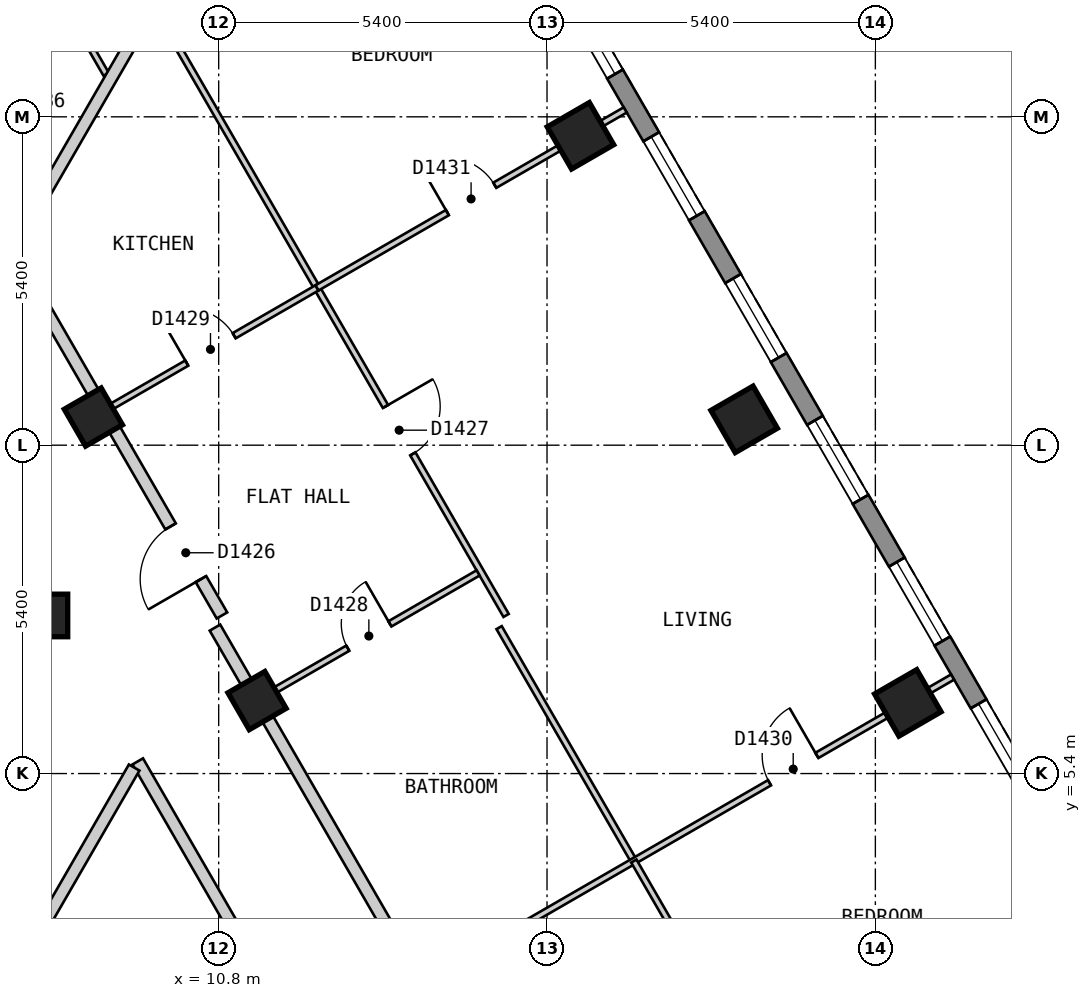
"""IFC4 building model, lengths in metres.
Left out: names, types, materials, properties, quantities, classifications, styles, units other than length and angle.
Written with IfcOpenShell. Run it as: python <this file> out.ifc"""

import sys

from ifc_helpers import new_model, si_unit, direction, frame, frame_2d, origin, origin_2d, place, context, subcontext, project, spatial, polyline, rectangle, outline, extrude, element, fill, save


model = new_model("IFC4")
c1 = context("Model", 3, precision=1e-05, world=origin(), true_north=direction((0.0, 1.0)))
c2 = subcontext(c1, "Body", "Model", "MODEL_VIEW")
j1 = project(units=[si_unit("LENGTHUNIT", "METRE"), si_unit("PLANEANGLEUNIT", "RADIAN")], contexts=[c1])
p1 = place(None, origin())
s1 = spatial("IfcSite", under=j1, at=p1, CompositionType="ELEMENT")
p2 = place(p1, origin())
s2 = spatial("IfcBuilding", under=s1, at=p2, CompositionType="ELEMENT")
p3 = place(p2, frame((0.0, 0.0, 166.2)))
s3 = spatial("IfcBuildingStorey", under=s2, at=p3, CompositionType="ELEMENT", Elevation=166.2)
for number, where, z_axis, x_axis in (
    (1, (22.134, 6.562, 0.0), (0.0, 0.0, 1.0), (-0.5, 0.866, 0.0)),
    (2, (19.442, 11.225, 0.0), (0.0, 0.0, 1.0), (-0.5, 0.866, 0.0)),
    (3, (16.75, 15.888, 0.0), (0.0, 0.0, 1.0), (-0.5, 0.866, 0.0)),
):
    element("IfcColumn", number, at=place(p3, frame(where, z_axis=z_axis, x_axis=x_axis)), inside=s3, PredefinedType="COLUMN", context=c2, shape_type="SweptSolid", body=[
        extrude(rectangle(XDim=0.8, YDim=0.8, at=origin_2d()), origin(), (0.0, 0.0, 1.0), 3.0),
    ])
for number, where, z_axis, x_axis in (
    (4, (11.431, 6.6, 0.0), (0.0, 0.0, 1.0), (-0.5, 0.866, 0.0)),
    (5, (7.967, 8.0, 0.0), (0.0, 0.0, 1.0), (1.0, 0.0, 0.0)),
    (6, (8.739, 11.263, 0.0), (0.0, 0.0, 1.0), (-0.5, 0.866, 0.0)),
):
    element("IfcColumn", number, at=place(p3, frame(where, z_axis=z_axis, x_axis=x_axis)), inside=s3, PredefinedType="COLUMN", context=c2, shape_type="SweptSolid", body=[
        extrude(rectangle(XDim=0.7, YDim=0.7, at=origin_2d()), origin(), (0.0, 0.0, 1.0), 3.0),
    ])
p4 = place(p3, frame((26.024, 1.825, 0.0), z_axis=(0.0, 0.0, 1.0), x_axis=(-0.500010537973, 0.866019319597, 0.0)))
e7 = element("IfcWall", 7, at=p4, inside=s3, PredefinedType="SOLIDWALL", context=c2, shape_type="SweptSolid", body=[
    extrude(outline(polyline([(0.0, -0.15), (22.863, -0.15), (22.783, 0.15), (0.08, 0.15), (0.0, -0.15)])), origin(), (0.0, 0.0, 1.0), 2.7),
])
p5 = place(p4, frame((1.259, 0.0, 0.15)))
e8 = element("IfcOpeningElement", 8, at=p5, cuts=e7, PredefinedType="OPENING", context=c2, shape_type="SweptSolid", body=[
    extrude(rectangle(XDim=1.5, YDim=2.1, at=frame_2d((0.75, 1.05))), frame((0.0, 0.16, 0.0), z_axis=(0.0, -1.0, 0.0), x_axis=(1.0, 0.0, 0.0)), (0.0, 0.0, 1.0), 0.32),
])
p6 = place(p4, frame((3.952, 0.0, 0.15)))
e9 = element("IfcOpeningElement", 9, at=p6, cuts=e7, PredefinedType="OPENING", context=c2, shape_type="SweptSolid", body=[
    extrude(rectangle(XDim=1.5, YDim=2.1, at=frame_2d((0.75, 1.05))), frame((0.0, 0.16, 0.0), z_axis=(0.0, -1.0, 0.0), x_axis=(1.0, 0.0, 0.0)), (0.0, 0.0, 1.0), 0.32),
])
p7 = place(p4, frame((6.644, 0.0, 0.15)))
e10 = element("IfcOpeningElement", 10, at=p7, cuts=e7, PredefinedType="OPENING", context=c2, shape_type="SweptSolid", body=[
    extrude(rectangle(XDim=1.5, YDim=2.1, at=frame_2d((0.75, 1.05))), frame((0.0, 0.16, 0.0), z_axis=(0.0, -1.0, 0.0), x_axis=(1.0, 0.0, 0.0)), (0.0, 0.0, 1.0), 0.32),
])
p8 = place(p4, frame((9.335, 0.0, 0.15)))
e11 = element("IfcOpeningElement", 11, at=p8, cuts=e7, PredefinedType="OPENING", context=c2, shape_type="SweptSolid", body=[
    extrude(rectangle(XDim=1.5, YDim=2.1, at=frame_2d((0.75, 1.05))), frame((0.0, 0.16, 0.0), z_axis=(0.0, -1.0, 0.0), x_axis=(1.0, 0.0, 0.0)), (0.0, 0.0, 1.0), 0.32),
])
p9 = place(p4, frame((12.028, 0.0, 0.15)))
e12 = element("IfcOpeningElement", 12, at=p9, cuts=e7, PredefinedType="OPENING", context=c2, shape_type="SweptSolid", body=[
    extrude(rectangle(XDim=1.5, YDim=2.1, at=frame_2d((0.75, 1.05))), frame((0.0, 0.16, 0.0), z_axis=(0.0, -1.0, 0.0), x_axis=(1.0, 0.0, 0.0)), (0.0, 0.0, 1.0), 0.32),
])
p10 = place(p4, frame((14.72, 0.0, 0.15)))
e13 = element("IfcOpeningElement", 13, at=p10, cuts=e7, PredefinedType="OPENING", context=c2, shape_type="SweptSolid", body=[
    extrude(rectangle(XDim=1.5, YDim=2.1, at=frame_2d((0.75, 1.05))), frame((0.0, 0.16, 0.0), z_axis=(0.0, -1.0, 0.0), x_axis=(1.0, 0.0, 0.0)), (0.0, 0.0, 1.0), 0.32),
])
p11 = place(p4, frame((17.411, 0.0, 0.15)))
e14 = element("IfcOpeningElement", 14, at=p11, cuts=e7, PredefinedType="OPENING", context=c2, shape_type="SweptSolid", body=[
    extrude(rectangle(XDim=1.5, YDim=2.1, at=frame_2d((0.75, 1.05))), frame((0.0, 0.16, 0.0), z_axis=(0.0, -1.0, 0.0), x_axis=(1.0, 0.0, 0.0)), (0.0, 0.0, 1.0), 0.32),
])
p12 = place(p4, frame((20.104, 0.0, 0.15)))
e15 = element("IfcOpeningElement", 15, at=p12, cuts=e7, PredefinedType="OPENING", context=c2, shape_type="SweptSolid", body=[
    extrude(rectangle(XDim=1.5, YDim=2.1, at=frame_2d((0.75, 1.05))), frame((0.0, 0.16, 0.0), z_axis=(0.0, -1.0, 0.0), x_axis=(1.0, 0.0, 0.0)), (0.0, 0.0, 1.0), 0.32),
])
p13 = place(p3, frame((9.469, 5.6, 0.0), z_axis=(0.0, 0.0, 1.0), x_axis=(0.499964524401, -0.866045884662, 0.0)))
e16 = element("IfcWall", 16, at=p13, inside=s3, PredefinedType="PARTITIONING", context=c2, shape_type="SweptSolid", body=[
    extrude(rectangle(XDim=7.042, YDim=0.2, at=frame_2d((3.521, 0.0))), origin(), (0.0, 0.0, 1.0), 2.7),
])
p14 = place(p13, frame((3.129, 0.0, 0.0)))
e17 = element("IfcOpeningElement", 17, at=p14, cuts=e16, PredefinedType="OPENING", context=c2, shape_type="SweptSolid", body=[
    extrude(rectangle(XDim=0.9, YDim=2.1, at=frame_2d((0.45, 1.05))), frame((0.0, 0.11, 0.0), z_axis=(0.0, -1.0, 0.0), x_axis=(1.0, 0.0, 0.0)), (0.0, 0.0, 1.0), 0.22),
])
p15 = place(p3, frame((10.739, 7.8, 0.0), z_axis=(0.0, 0.0, 1.0), x_axis=(0.499964311759, -0.86604600742, 0.0)))
e18 = element("IfcWall", 18, at=p15, inside=s3, PredefinedType="PARTITIONING", context=c2, shape_type="SweptSolid", body=[
    extrude(rectangle(XDim=9.583, YDim=0.2, at=frame_2d((4.792, 0.0))), origin(), (0.0, 0.0, 1.0), 2.7),
])
p16 = place(p3, frame((5.485, 17.3, 0.0), z_axis=(0.0, 0.0, 1.0), x_axis=(0.499965832213, -0.866045129667, 0.0)))
e19 = element("IfcWall", 19, at=p16, inside=s3, PredefinedType="PARTITIONING", context=c2, shape_type="SweptSolid", body=[
    extrude(rectangle(XDim=10.739, YDim=0.2, at=frame_2d((5.369, 0.0))), origin(), (0.0, 0.0, 1.0), 2.7),
])
p17 = place(p16, frame((9.048, 0.0, 0.0)))
e20 = element("IfcOpeningElement", 20, at=p17, cuts=e19, PredefinedType="OPENING", context=c2, shape_type="SweptSolid", body=[
    extrude(rectangle(XDim=1.0, YDim=2.1, at=frame_2d((0.5, 1.05))), frame((0.0, 0.11, 0.0), z_axis=(0.0, -1.0, 0.0), x_axis=(1.0, 0.0, 0.0)), (0.0, 0.0, 1.0), 0.22),
])
p18 = place(p16, frame((0.161, 0.0, 0.0)))
e21 = element("IfcOpeningElement", 21, at=p18, cuts=e19, PredefinedType="OPENING", context=c2, shape_type="SweptSolid", body=[
    extrude(rectangle(XDim=0.9, YDim=2.1, at=frame_2d((0.45, 1.05))), frame((0.0, 0.11, 0.0), z_axis=(0.0, -1.0, 0.0), x_axis=(1.0, 0.0, 0.0)), (0.0, 0.0, 1.0), 0.22),
])
p19 = place(p3, frame((7.028, 1.373, 0.0), z_axis=(0.0, 0.0, 1.0), x_axis=(0.499953126767, 0.866052464367, 0.0)))
e22 = element("IfcWall", 22, at=p19, inside=s3, PredefinedType="PARTITIONING", context=c2, shape_type="SweptSolid", body=[
    extrude(rectangle(XDim=4.764, YDim=0.2, at=frame_2d((2.382, 0.0))), origin(), (0.0, 0.0, 1.0), 2.7),
])
p20 = place(p3, frame((7.073, 20.15, 0.0), z_axis=(0.0, 0.0, 1.0), x_axis=(0.499917691695, -0.866072919292, 0.0)))
e23 = element("IfcWall", 23, at=p20, inside=s3, PredefinedType="PARTITIONING", context=c2, shape_type="SweptSolid", body=[
    extrude(rectangle(XDim=3.753, YDim=0.1, at=frame_2d((1.876, 0.0))), origin(), (0.0, 0.0, 1.0), 2.7),
])
p21 = place(p20, frame((1.432, 0.0, 0.0)))
e24 = element("IfcOpeningElement", 24, at=p21, cuts=e23, PredefinedType="OPENING", context=c2, shape_type="SweptSolid", body=[
    extrude(rectangle(XDim=0.9, YDim=2.1, at=frame_2d((0.45, 1.05))), frame((0.0, 0.06, 0.0), z_axis=(0.0, -1.0, 0.0), x_axis=(1.0, 0.0, 0.0)), (0.0, 0.0, 1.0), 0.12),
])
p22 = place(p3, frame((15.412, 7.8, 0.0), z_axis=(0.0, 0.0, 1.0), x_axis=(0.499882970317, -0.866092960361, 0.0)))
e25 = element("IfcWall", 25, at=p22, inside=s3, PredefinedType="PARTITIONING", context=c2, shape_type="SweptSolid", body=[
    extrude(rectangle(XDim=4.433, YDim=0.1, at=frame_2d((2.216, 0.0))), origin(), (0.0, 0.0, 1.0), 2.7),
])
p23 = place(p3, frame((9.827, 17.874, 0.0), z_axis=(0.0, 0.0, 1.0), x_axis=(0.499962189394, -0.866047232647, 0.0)))
e26 = element("IfcWall", 26, at=p23, inside=s3, PredefinedType="PARTITIONING", context=c2, shape_type="SweptSolid", body=[
    extrude(rectangle(XDim=11.401, YDim=0.1, at=frame_2d((5.701, 0.0))), origin(), (0.0, 0.0, 1.0), 2.7),
])
p24 = place(p23, frame((7.433, 0.0, 0.0)))
e27 = element("IfcOpeningElement", 27, at=p24, cuts=e26, PredefinedType="OPENING", context=c2, shape_type="SweptSolid", body=[
    extrude(rectangle(XDim=0.9, YDim=2.1, at=frame_2d((0.45, 1.05))), frame((0.0, 0.06, 0.0), z_axis=(0.0, -1.0, 0.0), x_axis=(1.0, 0.0, 0.0)), (0.0, 0.0, 1.0), 0.12),
])
p25 = place(p3, frame((14.21, 1.987, 0.0), z_axis=(0.0, 0.0, 1.0), x_axis=(0.866022959057, 0.500004234368, 0.0)))
e28 = element("IfcWall", 28, at=p25, inside=s3, PredefinedType="PARTITIONING", context=c2, shape_type="SweptSolid", body=[
    extrude(rectangle(XDim=10.0, YDim=0.1, at=frame_2d((5.0, 0.0))), origin(), (0.0, 0.0, 1.0), 2.7),
])
p26 = place(p25, frame((6.523, 0.0, 0.0)))
e29 = element("IfcOpeningElement", 29, at=p26, cuts=e28, PredefinedType="OPENING", context=c2, shape_type="SweptSolid", body=[
    extrude(rectangle(XDim=0.9, YDim=2.1, at=frame_2d((0.45, 1.05))), frame((0.0, 0.06, 0.0), z_axis=(0.0, -1.0, 0.0), x_axis=(1.0, 0.0, 0.0)), (0.0, 0.0, 1.0), 0.12),
])
p27 = place(p3, frame((11.518, 6.65, 0.0), z_axis=(0.0, 0.0, 1.0), x_axis=(0.865949381454, 0.500131651427, 0.0)))
e30 = element("IfcWall", 30, at=p27, inside=s3, PredefinedType="PARTITIONING", context=c2, shape_type="SweptSolid", body=[
    extrude(rectangle(XDim=4.097, YDim=0.1, at=frame_2d((2.049, 0.0))), origin(), (0.0, 0.0, 1.0), 2.7),
])
p28 = place(p27, frame((1.623, 0.0, 0.0)))
e31 = element("IfcOpeningElement", 31, at=p28, cuts=e30, PredefinedType="OPENING", context=c2, shape_type="SweptSolid", body=[
    extrude(rectangle(XDim=0.8, YDim=2.1, at=frame_2d((0.4, 1.05))), frame((0.0, 0.06, 0.0), z_axis=(0.0, -1.0, 0.0), x_axis=(1.0, 0.0, 0.0)), (0.0, 0.0, 1.0), 0.12),
])
p29 = place(p3, frame((8.999, 11.413, 0.0), z_axis=(0.0, 0.0, 1.0), x_axis=(0.865969252911, 0.500097243556, 0.0)))
e32 = element("IfcWall", 32, at=p29, inside=s3, PredefinedType="PARTITIONING", context=c2, shape_type="SweptSolid", body=[
    extrude(rectangle(XDim=3.947, YDim=0.1, at=frame_2d((1.974, 0.0))), origin(), (0.0, 0.0, 1.0), 2.7),
])
p30 = place(p29, frame((1.474, 0.0, 0.0)))
e33 = element("IfcOpeningElement", 33, at=p30, cuts=e32, PredefinedType="OPENING", context=c2, shape_type="SweptSolid", body=[
    extrude(rectangle(XDim=0.9, YDim=2.1, at=frame_2d((0.45, 1.05))), frame((0.0, 0.06, 0.0), z_axis=(0.0, -1.0, 0.0), x_axis=(1.0, 0.0, 0.0)), (0.0, 0.0, 1.0), 0.12),
])
p31 = place(p3, frame((6.269, 16.142, 0.0), z_axis=(0.0, 0.0, 1.0), x_axis=(0.798549086509, 0.601929693931, 0.0)))
e34 = element("IfcWall", 34, at=p31, inside=s3, PredefinedType="PARTITIONING", context=c2, shape_type="SweptSolid", body=[
    extrude(rectangle(XDim=2.67, YDim=0.1, at=frame_2d((1.335, 0.0))), origin(), (0.0, 0.0, 1.0), 2.7),
])
p32 = place(p31, frame((0.91, 0.0, 0.0)))
e35 = element("IfcOpeningElement", 35, at=p32, cuts=e34, PredefinedType="OPENING", context=c2, shape_type="SweptSolid", body=[
    extrude(rectangle(XDim=0.8, YDim=2.1, at=frame_2d((0.4, 1.05))), frame((0.0, 0.06, 0.0), z_axis=(0.0, -1.0, 0.0), x_axis=(1.0, 0.0, 0.0)), (0.0, 0.0, 1.0), 0.12),
])
p33 = place(p3, frame((7.448, 14.1, 0.0), z_axis=(0.0, 0.0, 1.0), x_axis=(0.500013426303, 0.866017651966, 0.0)))
e36 = element("IfcWall", 36, at=p33, inside=s3, PredefinedType="PARTITIONING", context=c2, shape_type="SweptSolid", body=[
    extrude(rectangle(XDim=4.358, YDim=0.2, at=frame_2d((2.179, 0.0))), origin(), (0.0, 0.0, 1.0), 2.7),
])
p34 = place(p3, frame((17.628, 3.961, 0.0), z_axis=(0.0, 0.0, 1.0), x_axis=(0.50003162148, -0.866007146345, 0.0)))
e37 = element("IfcWall", 37, at=p34, inside=s3, PredefinedType="PARTITIONING", context=c2, shape_type="SweptSolid", body=[
    extrude(rectangle(XDim=3.076, YDim=0.1, at=frame_2d((1.538, 0.0))), origin(), (0.0, 0.0, 1.0), 2.7),
])
p35 = place(p34, frame((1.167, 0.0, 0.0)))
e38 = element("IfcOpeningElement", 38, at=p35, cuts=e37, PredefinedType="OPENING", context=c2, shape_type="SweptSolid", body=[
    extrude(rectangle(XDim=0.8, YDim=2.1, at=frame_2d((0.4, 1.05))), frame((0.0, 0.06, 0.0), z_axis=(0.0, -1.0, 0.0), x_axis=(1.0, 0.0, 0.0)), (0.0, 0.0, 1.0), 0.12),
])
p36 = place(p3, frame((12.417, 13.387, 0.0), z_axis=(0.0, 0.0, 1.0), x_axis=(0.866070981966, 0.499921047963, 0.0)))
e39 = element("IfcWall", 39, at=p36, inside=s3, PredefinedType="PARTITIONING", context=c2, shape_type="SweptSolid", body=[
    extrude(rectangle(XDim=5.853, YDim=0.1, at=frame_2d((2.927, 0.0))), origin(), (0.0, 0.0, 1.0), 2.7),
])
p37 = place(p36, frame((2.476, 0.0, 0.0)))
e40 = element("IfcOpeningElement", 40, at=p37, cuts=e39, PredefinedType="OPENING", context=c2, shape_type="SweptSolid", body=[
    extrude(rectangle(XDim=0.9, YDim=2.1, at=frame_2d((0.45, 1.05))), frame((0.0, 0.06, 0.0), z_axis=(0.0, -1.0, 0.0), x_axis=(1.0, 0.0, 0.0)), (0.0, 0.0, 1.0), 0.12),
])
p38 = place(p6, origin())
e41 = element("IfcWindow", 41, at=p38, inside=s3, PartitioningType="SINGLE_PANEL", PredefinedType="WINDOW", context=c2, shape_type="SweptSolid", body=[
    extrude(rectangle(XDim=1.5, YDim=2.1, at=frame_2d((0.75, 1.05))), frame((0.0, 0.03, 0.0), z_axis=(0.0, -1.0, 0.0), x_axis=(1.0, 0.0, 0.0)), (0.0, 0.0, 1.0), 0.06),
])
fill(e9, e41)
p39 = place(p7, origin())
e42 = element("IfcWindow", 42, at=p39, inside=s3, PartitioningType="SINGLE_PANEL", PredefinedType="WINDOW", context=c2, shape_type="SweptSolid", body=[
    extrude(rectangle(XDim=1.5, YDim=2.1, at=frame_2d((0.75, 1.05))), frame((0.0, 0.03, 0.0), z_axis=(0.0, -1.0, 0.0), x_axis=(1.0, 0.0, 0.0)), (0.0, 0.0, 1.0), 0.06),
])
fill(e10, e42)
p40 = place(p8, origin())
e43 = element("IfcWindow", 43, at=p40, inside=s3, PartitioningType="SINGLE_PANEL", PredefinedType="WINDOW", context=c2, shape_type="SweptSolid", body=[
    extrude(rectangle(XDim=1.5, YDim=2.1, at=frame_2d((0.75, 1.05))), frame((0.0, 0.03, 0.0), z_axis=(0.0, -1.0, 0.0), x_axis=(1.0, 0.0, 0.0)), (0.0, 0.0, 1.0), 0.06),
])
fill(e11, e43)
p41 = place(p9, origin())
e44 = element("IfcWindow", 44, at=p41, inside=s3, PartitioningType="SINGLE_PANEL", PredefinedType="WINDOW", context=c2, shape_type="SweptSolid", body=[
    extrude(rectangle(XDim=1.5, YDim=2.1, at=frame_2d((0.75, 1.05))), frame((0.0, 0.03, 0.0), z_axis=(0.0, -1.0, 0.0), x_axis=(1.0, 0.0, 0.0)), (0.0, 0.0, 1.0), 0.06),
])
fill(e12, e44)
p42 = place(p10, origin())
e45 = element("IfcWindow", 45, at=p42, inside=s3, PartitioningType="SINGLE_PANEL", PredefinedType="WINDOW", context=c2, shape_type="SweptSolid", body=[
    extrude(rectangle(XDim=1.5, YDim=2.1, at=frame_2d((0.75, 1.05))), frame((0.0, 0.03, 0.0), z_axis=(0.0, -1.0, 0.0), x_axis=(1.0, 0.0, 0.0)), (0.0, 0.0, 1.0), 0.06),
])
fill(e13, e45)
p43 = place(p11, origin())
e46 = element("IfcWindow", 46, at=p43, inside=s3, PartitioningType="SINGLE_PANEL", PredefinedType="WINDOW", context=c2, shape_type="SweptSolid", body=[
    extrude(rectangle(XDim=1.5, YDim=2.1, at=frame_2d((0.75, 1.05))), frame((0.0, 0.03, 0.0), z_axis=(0.0, -1.0, 0.0), x_axis=(1.0, 0.0, 0.0)), (0.0, 0.0, 1.0), 0.06),
])
fill(e14, e46)
p44 = place(p17, origin())
e47 = element("IfcDoor", 47, at=p44, inside=s3, OperationType="SINGLE_SWING_RIGHT", PredefinedType="DOOR", context=c2, shape_type="SweptSolid", body=[
    extrude(rectangle(XDim=1.0, YDim=2.1, at=frame_2d((0.5, 1.05))), frame((0.0, 0.025, 0.0), z_axis=(0.0, -1.0, 0.0), x_axis=(1.0, 0.0, 0.0)), (0.0, 0.0, 1.0), 0.05),
])
fill(e20, e47)
p45 = place(p24, origin())
e48 = element("IfcDoor", 48, at=p45, inside=s3, OperationType="SINGLE_SWING_LEFT", PredefinedType="DOOR", context=c2, shape_type="SweptSolid", body=[
    extrude(rectangle(XDim=0.9, YDim=2.1, at=frame_2d((0.45, 1.05))), frame((0.0, 0.025, 0.0), z_axis=(0.0, -1.0, 0.0), x_axis=(1.0, 0.0, 0.0)), (0.0, 0.0, 1.0), 0.05),
])
fill(e27, e48)
p46 = place(p28, origin())
e49 = element("IfcDoor", 49, at=p46, inside=s3, OperationType="SINGLE_SWING_RIGHT", PredefinedType="DOOR", context=c2, shape_type="SweptSolid", body=[
    extrude(rectangle(XDim=0.8, YDim=2.1, at=frame_2d((0.4, 1.05))), frame((0.0, 0.025, 0.0), z_axis=(0.0, -1.0, 0.0), x_axis=(1.0, 0.0, 0.0)), (0.0, 0.0, 1.0), 0.05),
])
fill(e31, e49)
p47 = place(p30, origin())
e50 = element("IfcDoor", 50, at=p47, inside=s3, OperationType="SINGLE_SWING_LEFT", PredefinedType="DOOR", context=c2, shape_type="SweptSolid", body=[
    extrude(rectangle(XDim=0.9, YDim=2.1, at=frame_2d((0.45, 1.05))), frame((0.0, 0.025, 0.0), z_axis=(0.0, -1.0, 0.0), x_axis=(1.0, 0.0, 0.0)), (0.0, 0.0, 1.0), 0.05),
])
fill(e33, e50)
p48 = place(p26, origin())
e51 = element("IfcDoor", 51, at=p48, inside=s3, OperationType="SINGLE_SWING_RIGHT", PredefinedType="DOOR", context=c2, shape_type="SweptSolid", body=[
    extrude(rectangle(XDim=0.9, YDim=2.1, at=frame_2d((0.45, 1.05))), frame((0.0, 0.025, 0.0), z_axis=(0.0, -1.0, 0.0), x_axis=(1.0, 0.0, 0.0)), (0.0, 0.0, 1.0), 0.05),
])
fill(e29, e51)
p49 = place(p37, origin())
e52 = element("IfcDoor", 52, at=p49, inside=s3, OperationType="SINGLE_SWING_LEFT", PredefinedType="DOOR", context=c2, shape_type="SweptSolid", body=[
    extrude(rectangle(XDim=0.9, YDim=2.1, at=frame_2d((0.45, 1.05))), frame((0.0, 0.025, 0.0), z_axis=(0.0, -1.0, 0.0), x_axis=(1.0, 0.0, 0.0)), (0.0, 0.0, 1.0), 0.05),
])
fill(e40, e52)
save(model, sys.argv[1])
